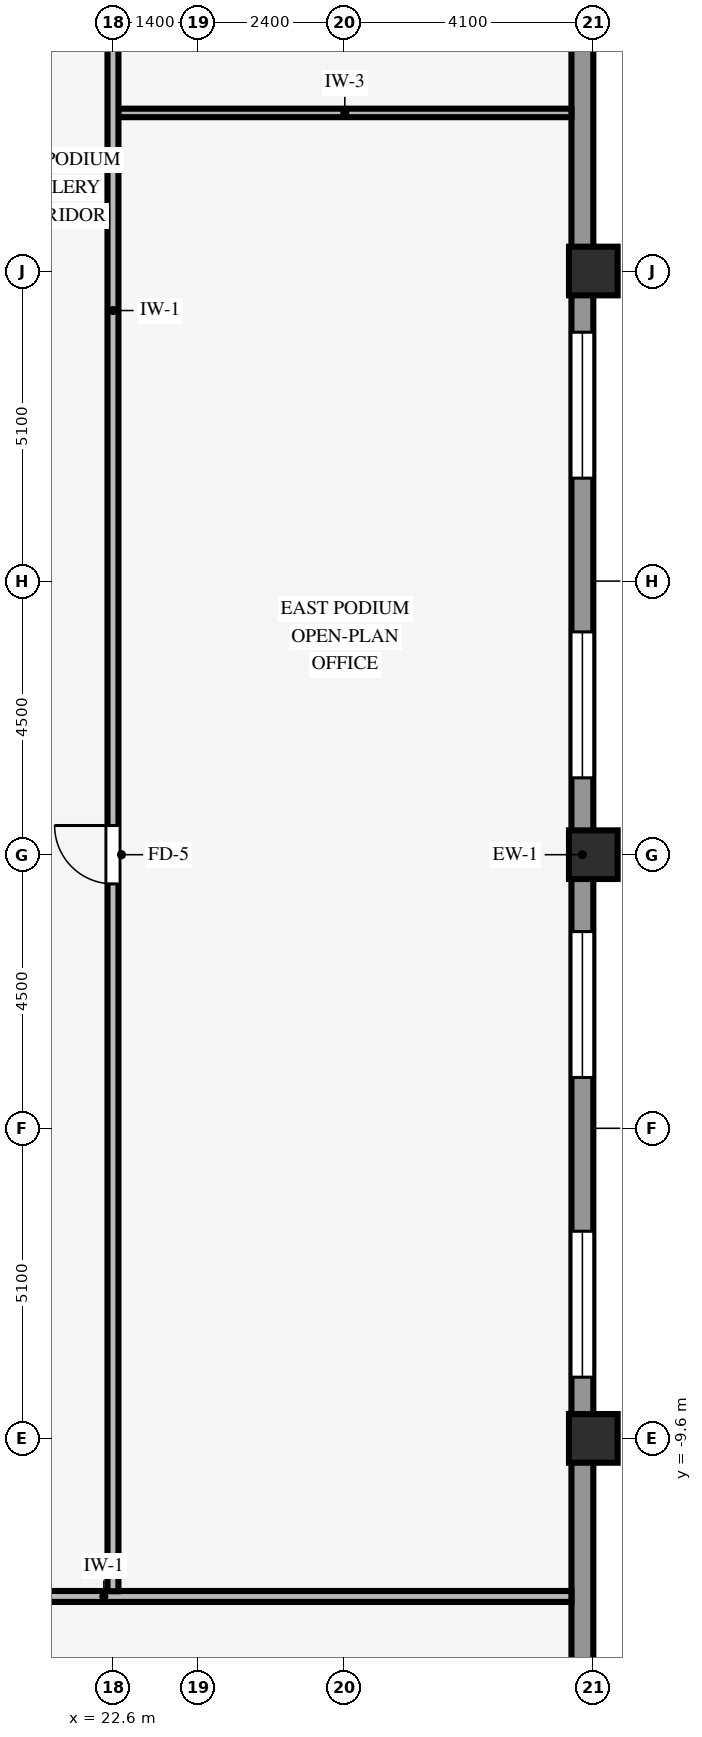
"""IFC4 building model, lengths in metres.
Left out: names, types, materials, properties, quantities, classifications, styles, units other than length and angle.
Written with IfcOpenShell. Run it as: python <this file> out.ifc"""

import sys

from ifc_helpers import new_model, si_unit, direction, frame, frame_2d, origin, origin_2d, place, context, subcontext, project, spatial, rectangle, hollow_rectangle, extrude, source, transform, mapped, element, fill, save


model = new_model("IFC4")
c1 = context("Model", 3, precision=1e-05, world=origin(), true_north=direction((0.0, 1.0)))
c2 = subcontext(c1, "Body", "Model", "MODEL_VIEW")
j1 = project(units=[si_unit("LENGTHUNIT", "METRE"), si_unit("PLANEANGLEUNIT", "RADIAN")], contexts=[c1])
p1 = place(None, origin())
s1 = spatial("IfcSite", under=j1, at=p1, CompositionType="ELEMENT")
p2 = place(p1, origin())
s2 = spatial("IfcBuilding", under=s1, at=p2, CompositionType="ELEMENT")
p3 = place(p2, frame((0.0, 0.0, 9.2)))
s3 = spatial("IfcBuildingStorey", under=s2, at=p3, CompositionType="ELEMENT", Elevation=9.2)
for number, where, z_axis, x_axis in (
    (1, (30.5, -9.6, 0.0), (0.0, 0.0, 1.0), (1.0, 0.0, 0.0)),
    (2, (30.5, 0.0, 0.0), (0.0, 0.0, 1.0), (1.0, 0.0, 0.0)),
    (3, (30.5, 9.6, 0.0), (0.0, 0.0, 1.0), (1.0, 0.0, 0.0)),
):
    element("IfcColumn", number, at=place(p3, frame(where, z_axis=z_axis, x_axis=x_axis)), inside=s3, PredefinedType="COLUMN", context=c2, shape_type="SweptSolid", body=[
        extrude(hollow_rectangle(XDim=0.8, YDim=0.8, WallThickness=0.055, InnerFilletRadius=0.055, OuterFilletRadius=0.11, at=origin_2d()), origin(), (0.0, 0.0, 1.0), 4.28),
    ])
p4 = place(p3, frame((30.32, -25.644, 0.0), z_axis=(0.0, 0.0, 1.0), x_axis=(0.0, 1.0, 0.0)))
e4 = element("IfcWall", 4, at=p4, inside=s3, PredefinedType="STANDARD", context=c2, shape_type="SweptSolid", body=[
    extrude(rectangle(XDim=51.288, YDim=0.36, at=frame_2d((25.644, 0.0))), origin(), (0.0, 0.0, 1.0), 3.615),
])
p5 = place(p4, frame((2.264, 0.0, 0.85)))
e5 = element("IfcOpeningElement", 5, at=p5, cuts=e4, PredefinedType="OPENING", context=c2, shape_type="SweptSolid", body=[
    extrude(rectangle(XDim=2.4, YDim=2.45, at=frame_2d((1.2, 1.225))), frame((0.0, 0.19, 0.0), z_axis=(0.0, -1.0, 0.0), x_axis=(1.0, 0.0, 0.0)), (0.0, 0.0, 1.0), 0.38),
])
p6 = place(p4, frame((17.051, 0.0, 0.85)))
e6 = element("IfcOpeningElement", 6, at=p6, cuts=e4, PredefinedType="OPENING", context=c2, shape_type="SweptSolid", body=[
    extrude(rectangle(XDim=2.4, YDim=2.45, at=frame_2d((1.2, 1.225))), frame((0.0, 0.19, 0.0), z_axis=(0.0, -1.0, 0.0), x_axis=(1.0, 0.0, 0.0)), (0.0, 0.0, 1.0), 0.38),
])
p7 = place(p4, frame((21.979, 0.0, 0.85)))
e7 = element("IfcOpeningElement", 7, at=p7, cuts=e4, PredefinedType="OPENING", context=c2, shape_type="SweptSolid", body=[
    extrude(rectangle(XDim=2.4, YDim=2.45, at=frame_2d((1.2, 1.225))), frame((0.0, 0.19, 0.0), z_axis=(0.0, -1.0, 0.0), x_axis=(1.0, 0.0, 0.0)), (0.0, 0.0, 1.0), 0.38),
])
p8 = place(p4, frame((26.908, 0.0, 0.85)))
e8 = element("IfcOpeningElement", 8, at=p8, cuts=e4, PredefinedType="OPENING", context=c2, shape_type="SweptSolid", body=[
    extrude(rectangle(XDim=2.4, YDim=2.45, at=frame_2d((1.2, 1.225))), frame((0.0, 0.19, 0.0), z_axis=(0.0, -1.0, 0.0), x_axis=(1.0, 0.0, 0.0)), (0.0, 0.0, 1.0), 0.38),
])
p9 = place(p4, frame((31.837, 0.0, 0.85)))
e9 = element("IfcOpeningElement", 9, at=p9, cuts=e4, PredefinedType="OPENING", context=c2, shape_type="SweptSolid", body=[
    extrude(rectangle(XDim=2.4, YDim=2.45, at=frame_2d((1.2, 1.225))), frame((0.0, 0.19, 0.0), z_axis=(0.0, -1.0, 0.0), x_axis=(1.0, 0.0, 0.0)), (0.0, 0.0, 1.0), 0.38),
])
p10 = place(p4, frame((46.624, 0.0, 0.85)))
e10 = element("IfcOpeningElement", 10, at=p10, cuts=e4, PredefinedType="OPENING", context=c2, shape_type="SweptSolid", body=[
    extrude(rectangle(XDim=2.4, YDim=2.45, at=frame_2d((1.2, 1.225))), frame((0.0, 0.19, 0.0), z_axis=(0.0, -1.0, 0.0), x_axis=(1.0, 0.0, 0.0)), (0.0, 0.0, 1.0), 0.38),
])
p11 = place(p3, frame((7.86, -12.2, 0.0), z_axis=(0.0, 0.0, 1.0), x_axis=(1.0, 0.0, 0.0)))
e11 = element("IfcWall", 11, at=p11, inside=s3, PredefinedType="PARTITIONING", context=c2, shape_type="SweptSolid", body=[
    extrude(rectangle(XDim=22.28, YDim=0.18, at=frame_2d((11.14, 0.0))), origin(), (0.0, 0.0, 1.0), 4.27),
])
p12 = place(p11, frame((5.49, 0.0, 0.0)))
e12 = element("IfcOpeningElement", 12, at=p12, cuts=e11, PredefinedType="OPENING", context=c2, shape_type="SweptSolid", body=[
    extrude(rectangle(XDim=0.96, YDim=2.1, at=frame_2d((0.48, 1.05))), frame((0.0, 0.1, 0.0), z_axis=(0.0, -1.0, 0.0), x_axis=(1.0, 0.0, 0.0)), (0.0, 0.0, 1.0), 0.2),
])
p13 = place(p3, frame((22.686, 12.2, 0.0), z_axis=(0.0, 0.0, 1.0), x_axis=(1.0, 0.0, 0.0)))
e13 = element("IfcWall", 13, at=p13, inside=s3, PredefinedType="PARTITIONING", context=c2, shape_type="SweptSolid", body=[
    extrude(rectangle(XDim=7.454, YDim=0.14, at=frame_2d((3.727, 0.0))), origin(), (0.0, 0.0, 1.0), 4.27),
])
p14 = place(p3, frame((22.6, -12.114, 0.0), z_axis=(0.0, 0.0, 1.0), x_axis=(0.0, 1.0, 0.0)))
e14 = element("IfcWall", 14, at=p14, inside=s3, PredefinedType="PARTITIONING", context=c2, shape_type="SweptSolid", body=[
    extrude(rectangle(XDim=37.919, YDim=0.18, at=frame_2d((18.959, 0.0))), origin(), (0.0, 0.0, 1.0), 4.27),
])
p15 = place(p14, frame((11.634, 0.0, 0.0)))
e15 = element("IfcOpeningElement", 15, at=p15, cuts=e14, PredefinedType="OPENING", context=c2, shape_type="SweptSolid", body=[
    extrude(rectangle(XDim=0.96, YDim=2.1, at=frame_2d((0.48, 1.05))), frame((0.0, 0.1, 0.0), z_axis=(0.0, -1.0, 0.0), x_axis=(1.0, 0.0, 0.0)), (0.0, 0.0, 1.0), 0.2),
])
p16 = place(p14, frame((29.534, 0.0, 0.0)))
e16 = element("IfcOpeningElement", 16, at=p16, cuts=e14, PredefinedType="OPENING", context=c2, shape_type="SweptSolid", body=[
    extrude(rectangle(XDim=0.96, YDim=2.1, at=frame_2d((0.48, 1.05))), frame((0.0, 0.1, 0.0), z_axis=(0.0, -1.0, 0.0), x_axis=(1.0, 0.0, 0.0)), (0.0, 0.0, 1.0), 0.2),
])
m1 = source(origin(), c2, "Body", "SweptSolid", [
    extrude(rectangle(XDim=2.4, YDim=2.45, at=frame_2d((1.2, 1.225))), frame((0.0, 0.03, 0.0), z_axis=(0.0, -1.0, 0.0), x_axis=(1.0, 0.0, 0.0)), (0.0, 0.0, 1.0), 0.06),
])
p17 = place(p6, origin())
e17 = element("IfcWindow", 17, at=p17, inside=s3, PartitioningType="SINGLE_PANEL", PredefinedType="WINDOW", context=c2, shape_type="MappedRepresentation", body=[
    mapped(m1, transform((0.0, 0.0, 0.0), scale=1.0)),
])
fill(e6, e17)
p18 = place(p7, origin())
e18 = element("IfcWindow", 18, at=p18, inside=s3, PartitioningType="SINGLE_PANEL", PredefinedType="WINDOW", context=c2, shape_type="MappedRepresentation", body=[
    mapped(m1, transform((0.0, 0.0, 0.0), scale=1.0)),
])
fill(e7, e18)
p19 = place(p8, origin())
e19 = element("IfcWindow", 19, at=p19, inside=s3, PartitioningType="SINGLE_PANEL", PredefinedType="WINDOW", context=c2, shape_type="MappedRepresentation", body=[
    mapped(m1, transform((0.0, 0.0, 0.0), scale=1.0)),
])
fill(e8, e19)
p20 = place(p9, origin())
e20 = element("IfcWindow", 20, at=p20, inside=s3, PartitioningType="SINGLE_PANEL", PredefinedType="WINDOW", context=c2, shape_type="MappedRepresentation", body=[
    mapped(m1, transform((0.0, 0.0, 0.0), scale=1.0)),
])
fill(e9, e20)
m2 = source(origin(), c2, "Body", "SweptSolid", [
    extrude(rectangle(XDim=0.96, YDim=2.1, at=frame_2d((0.48, 1.05))), frame((0.0, 0.025, 0.0), z_axis=(0.0, -1.0, 0.0), x_axis=(1.0, 0.0, 0.0)), (0.0, 0.0, 1.0), 0.05),
])
p21 = place(p15, origin())
e21 = element("IfcDoor", 21, at=p21, inside=s3, OperationType="SINGLE_SWING_RIGHT", PredefinedType="DOOR", context=c2, shape_type="MappedRepresentation", body=[
    mapped(m2, transform((0.0, 0.0, 0.0), scale=1.0)),
])
fill(e15, e21)
save(model, sys.argv[1])
